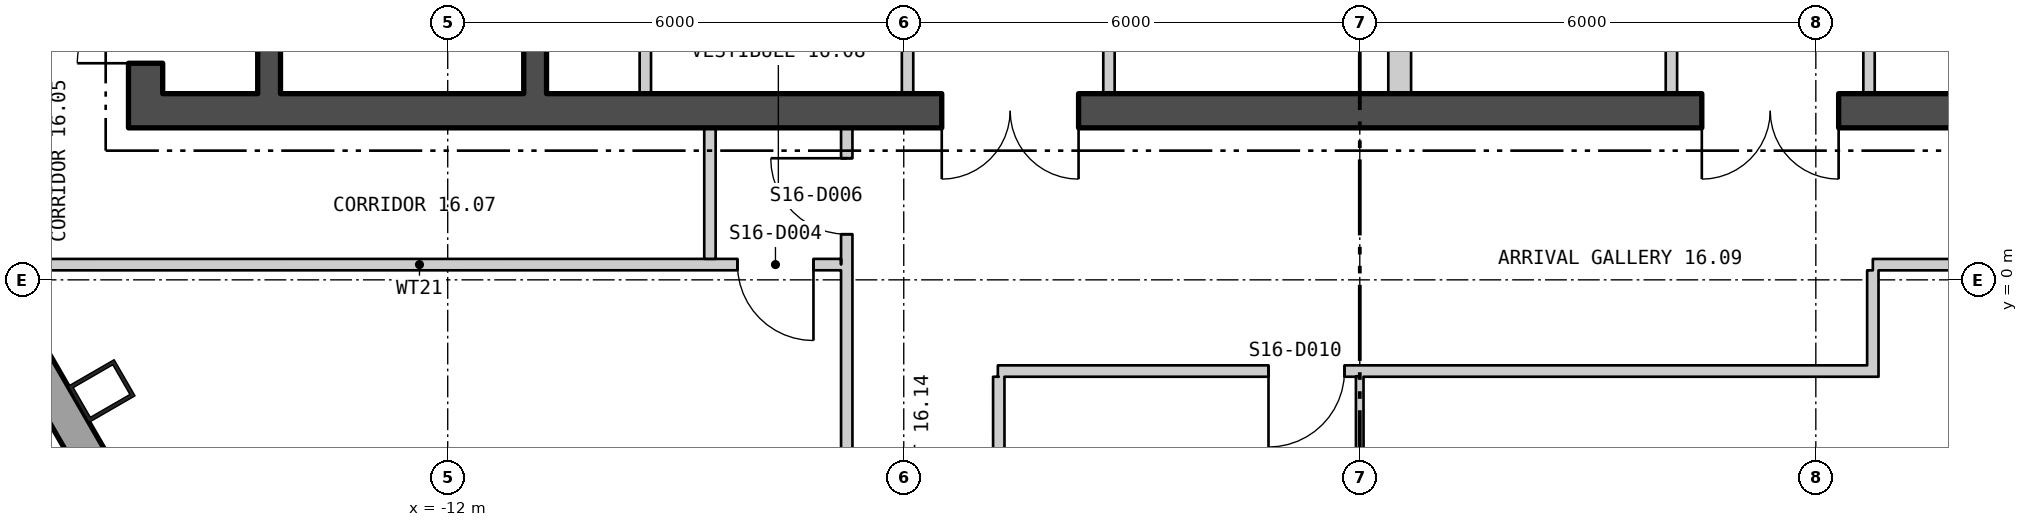
"""IFC4 building model, lengths in metres.
Left out: names, types, materials, properties, quantities, classifications, styles, units other than length and angle.
Written with IfcOpenShell. Run it as: python <this file> out.ifc"""

import sys

from ifc_helpers import new_model, si_unit, direction, frame, frame_2d, origin, origin_2d, place, context, subcontext, project, spatial, polyline, rectangle, hollow_rectangle, outline, extrude, element, fill, save


model = new_model("IFC4")
c1 = context("Model", 3, precision=1e-05, world=origin(), true_north=direction((0.0, 1.0)))
c2 = subcontext(c1, "Body", "Model", "MODEL_VIEW")
j1 = project(units=[si_unit("LENGTHUNIT", "METRE"), si_unit("PLANEANGLEUNIT", "RADIAN")], contexts=[c1])
p1 = place(None, origin())
s1 = spatial("IfcSite", under=j1, at=p1, CompositionType="ELEMENT")
p2 = place(p1, origin())
s2 = spatial("IfcBuilding", under=s1, at=p2, CompositionType="ELEMENT")
p3 = place(p2, frame((0.0, 0.0, 216.0)))
s3 = spatial("IfcBuildingStorey", under=s2, at=p3, CompositionType="ELEMENT", Elevation=216.0)
p4 = place(p3, frame((-16.554, -1.463, 0.0), z_axis=(0.0, 0.0, 1.0), x_axis=(0.5, -0.866025403784, 0.0)))
e1 = element("IfcColumn", 1, at=p4, inside=s3, PredefinedType="COLUMN", context=c2, shape_type="SweptSolid", body=[
    extrude(hollow_rectangle(XDim=0.55, YDim=0.7, WallThickness=0.05, at=origin_2d()), origin(), (0.0, 0.0, 1.0), 3.9),
])
p5 = place(p3, frame((-26.235, 14.155, -0.18), z_axis=(0.0, 0.0, 1.0), x_axis=(0.500000335318, -0.866025210188, 0.0)))
e2 = element("IfcWall", 2, at=p5, inside=s3, PredefinedType="SOLIDWALL", context=c2, shape_type="SweptSolid", body=[
    extrude(outline(polyline([(-0.13, -0.225), (45.88, -0.225), (45.62, 0.225), (0.13, 0.225), (-0.13, -0.225)])), origin(), (0.0, 0.0, 1.0), 3.68),
])
p6 = place(p5, frame((1.425, 0.0, 1.08)))
e3 = element("IfcOpeningElement", 3, at=p6, cuts=e2, PredefinedType="OPENING", context=c2, shape_type="SweptSolid", body=[
    extrude(rectangle(XDim=2.4, YDim=2.0, at=frame_2d((1.2, 1.0))), frame((0.0, 0.235, 0.0), z_axis=(0.0, -1.0, 0.0), x_axis=(1.0, 0.0, 0.0)), (0.0, 0.0, 1.0), 0.47),
])
p7 = place(p5, frame((5.895, 0.0, 1.08)))
e4 = element("IfcOpeningElement", 4, at=p7, cuts=e2, PredefinedType="OPENING", context=c2, shape_type="SweptSolid", body=[
    extrude(rectangle(XDim=2.4, YDim=2.0, at=frame_2d((1.2, 1.0))), frame((0.0, 0.235, 0.0), z_axis=(0.0, -1.0, 0.0), x_axis=(1.0, 0.0, 0.0)), (0.0, 0.0, 1.0), 0.47),
])
p8 = place(p5, frame((10.403, 0.0, 1.08)))
e5 = element("IfcOpeningElement", 5, at=p8, cuts=e2, PredefinedType="OPENING", context=c2, shape_type="SweptSolid", body=[
    extrude(rectangle(XDim=2.4, YDim=2.0, at=frame_2d((1.2, 1.0))), frame((0.0, 0.235, 0.0), z_axis=(0.0, -1.0, 0.0), x_axis=(1.0, 0.0, 0.0)), (0.0, 0.0, 1.0), 0.47),
])
p9 = place(p5, frame((19.421, 0.0, 1.08)))
e6 = element("IfcOpeningElement", 6, at=p9, cuts=e2, PredefinedType="OPENING", context=c2, shape_type="SweptSolid", body=[
    extrude(rectangle(XDim=2.4, YDim=2.0, at=frame_2d((1.2, 1.0))), frame((0.0, 0.235, 0.0), z_axis=(0.0, -1.0, 0.0), x_axis=(1.0, 0.0, 0.0)), (0.0, 0.0, 1.0), 0.47),
])
p10 = place(p5, frame((23.929, 0.0, 1.08)))
e7 = element("IfcOpeningElement", 7, at=p10, cuts=e2, PredefinedType="OPENING", context=c2, shape_type="SweptSolid", body=[
    extrude(rectangle(XDim=2.4, YDim=2.0, at=frame_2d((1.2, 1.0))), frame((0.0, 0.235, 0.0), z_axis=(0.0, -1.0, 0.0), x_axis=(1.0, 0.0, 0.0)), (0.0, 0.0, 1.0), 0.47),
])
p11 = place(p5, frame((28.438, 0.0, 1.08)))
e8 = element("IfcOpeningElement", 8, at=p11, cuts=e2, PredefinedType="OPENING", context=c2, shape_type="SweptSolid", body=[
    extrude(rectangle(XDim=2.4, YDim=2.0, at=frame_2d((1.2, 1.0))), frame((0.0, 0.235, 0.0), z_axis=(0.0, -1.0, 0.0), x_axis=(1.0, 0.0, 0.0)), (0.0, 0.0, 1.0), 0.47),
])
p12 = place(p5, frame((32.947, 0.0, 1.08)))
e9 = element("IfcOpeningElement", 9, at=p12, cuts=e2, PredefinedType="OPENING", context=c2, shape_type="SweptSolid", body=[
    extrude(rectangle(XDim=2.4, YDim=2.0, at=frame_2d((1.2, 1.0))), frame((0.0, 0.235, 0.0), z_axis=(0.0, -1.0, 0.0), x_axis=(1.0, 0.0, 0.0)), (0.0, 0.0, 1.0), 0.47),
])
p13 = place(p5, frame((41.925, 0.0, 1.08)))
e10 = element("IfcOpeningElement", 10, at=p13, cuts=e2, PredefinedType="OPENING", context=c2, shape_type="SweptSolid", body=[
    extrude(rectangle(XDim=2.4, YDim=2.0, at=frame_2d((1.2, 1.0))), frame((0.0, 0.235, 0.0), z_axis=(0.0, -1.0, 0.0), x_axis=(1.0, 0.0, 0.0)), (0.0, 0.0, 1.0), 0.47),
])
p14 = place(p3, frame((3.36, -25.466, -0.18), z_axis=(0.0, 0.0, 1.0), x_axis=(0.500000335318, 0.866025210188, 0.0)))
e11 = element("IfcWall", 11, at=p14, inside=s3, PredefinedType="SOLIDWALL", context=c2, shape_type="SweptSolid", body=[
    extrude(outline(polyline([(-0.13, -0.225), (45.88, -0.225), (45.62, 0.225), (0.13, 0.225), (-0.13, -0.225)])), origin(), (0.0, 0.0, 1.0), 3.68),
])
p15 = place(p14, frame((1.425, 0.0, 1.08)))
e12 = element("IfcOpeningElement", 12, at=p15, cuts=e11, PredefinedType="OPENING", context=c2, shape_type="SweptSolid", body=[
    extrude(rectangle(XDim=2.4, YDim=2.0, at=frame_2d((1.2, 1.0))), frame((0.0, 0.235, 0.0), z_axis=(0.0, -1.0, 0.0), x_axis=(1.0, 0.0, 0.0)), (0.0, 0.0, 1.0), 0.47),
])
p16 = place(p14, frame((5.895, 0.0, 1.08)))
e13 = element("IfcOpeningElement", 13, at=p16, cuts=e11, PredefinedType="OPENING", context=c2, shape_type="SweptSolid", body=[
    extrude(rectangle(XDim=2.4, YDim=2.0, at=frame_2d((1.2, 1.0))), frame((0.0, 0.235, 0.0), z_axis=(0.0, -1.0, 0.0), x_axis=(1.0, 0.0, 0.0)), (0.0, 0.0, 1.0), 0.47),
])
p17 = place(p14, frame((10.403, 0.0, 1.08)))
e14 = element("IfcOpeningElement", 14, at=p17, cuts=e11, PredefinedType="OPENING", context=c2, shape_type="SweptSolid", body=[
    extrude(rectangle(XDim=2.4, YDim=2.0, at=frame_2d((1.2, 1.0))), frame((0.0, 0.235, 0.0), z_axis=(0.0, -1.0, 0.0), x_axis=(1.0, 0.0, 0.0)), (0.0, 0.0, 1.0), 0.47),
])
p18 = place(p14, frame((14.912, 0.0, 1.08)))
e15 = element("IfcOpeningElement", 15, at=p18, cuts=e11, PredefinedType="OPENING", context=c2, shape_type="SweptSolid", body=[
    extrude(rectangle(XDim=2.4, YDim=2.0, at=frame_2d((1.2, 1.0))), frame((0.0, 0.235, 0.0), z_axis=(0.0, -1.0, 0.0), x_axis=(1.0, 0.0, 0.0)), (0.0, 0.0, 1.0), 0.47),
])
p19 = place(p14, frame((19.421, 0.0, 1.08)))
e16 = element("IfcOpeningElement", 16, at=p19, cuts=e11, PredefinedType="OPENING", context=c2, shape_type="SweptSolid", body=[
    extrude(rectangle(XDim=2.4, YDim=2.0, at=frame_2d((1.2, 1.0))), frame((0.0, 0.235, 0.0), z_axis=(0.0, -1.0, 0.0), x_axis=(1.0, 0.0, 0.0)), (0.0, 0.0, 1.0), 0.47),
])
p20 = place(p14, frame((23.929, 0.0, 1.08)))
e17 = element("IfcOpeningElement", 17, at=p20, cuts=e11, PredefinedType="OPENING", context=c2, shape_type="SweptSolid", body=[
    extrude(rectangle(XDim=2.4, YDim=2.0, at=frame_2d((1.2, 1.0))), frame((0.0, 0.235, 0.0), z_axis=(0.0, -1.0, 0.0), x_axis=(1.0, 0.0, 0.0)), (0.0, 0.0, 1.0), 0.47),
])
p21 = place(p14, frame((32.947, 0.0, 1.08)))
e18 = element("IfcOpeningElement", 18, at=p21, cuts=e11, PredefinedType="OPENING", context=c2, shape_type="SweptSolid", body=[
    extrude(rectangle(XDim=2.4, YDim=2.0, at=frame_2d((1.2, 1.0))), frame((0.0, 0.235, 0.0), z_axis=(0.0, -1.0, 0.0), x_axis=(1.0, 0.0, 0.0)), (0.0, 0.0, 1.0), 0.47),
])
p22 = place(p14, frame((37.455, 0.0, 1.08)))
e19 = element("IfcOpeningElement", 19, at=p22, cuts=e11, PredefinedType="OPENING", context=c2, shape_type="SweptSolid", body=[
    extrude(rectangle(XDim=2.4, YDim=2.0, at=frame_2d((1.2, 1.0))), frame((0.0, 0.235, 0.0), z_axis=(0.0, -1.0, 0.0), x_axis=(1.0, 0.0, 0.0)), (0.0, 0.0, 1.0), 0.47),
])
p23 = place(p14, frame((41.925, 0.0, 1.08)))
e20 = element("IfcOpeningElement", 20, at=p23, cuts=e11, PredefinedType="OPENING", context=c2, shape_type="SweptSolid", body=[
    extrude(rectangle(XDim=2.4, YDim=2.0, at=frame_2d((1.2, 1.0))), frame((0.0, 0.235, 0.0), z_axis=(0.0, -1.0, 0.0), x_axis=(1.0, 0.0, 0.0)), (0.0, 0.0, 1.0), 0.47),
])
p24 = place(p3, frame((-16.2, 2.225, 0.0), z_axis=(0.0, 0.0, 1.0), x_axis=(1.0, 0.0, 0.0)))
e21 = element("IfcWall", 21, at=p24, inside=s3, PredefinedType="SHEAR", context=c2, shape_type="SweptSolid", body=[
    extrude(rectangle(XDim=32.4, YDim=0.45, at=frame_2d((16.2, 0.0))), origin(), (0.0, 0.0, 1.0), 3.7),
])
p25 = place(p24, frame((10.7, 0.0, 0.0)))
e22 = element("IfcOpeningElement", 22, at=p25, cuts=e21, PredefinedType="OPENING", context=c2, shape_type="SweptSolid", body=[
    extrude(rectangle(XDim=1.8, YDim=2.4, at=frame_2d((0.9, 1.2))), frame((0.0, 0.235, 0.0), z_axis=(0.0, -1.0, 0.0), x_axis=(1.0, 0.0, 0.0)), (0.0, 0.0, 1.0), 0.47),
])
p26 = place(p24, frame((20.7, 0.0, 0.0)))
e23 = element("IfcOpeningElement", 23, at=p26, cuts=e21, PredefinedType="OPENING", context=c2, shape_type="SweptSolid", body=[
    extrude(rectangle(XDim=1.8, YDim=2.4, at=frame_2d((0.9, 1.2))), frame((0.0, 0.235, 0.0), z_axis=(0.0, -1.0, 0.0), x_axis=(1.0, 0.0, 0.0)), (0.0, 0.0, 1.0), 0.47),
])
p27 = place(p3, frame((-15.975, 2.45, 0.0), z_axis=(0.0, 0.0, 1.0), x_axis=(0.0, 1.0, 0.0)))
e24 = element("IfcWall", 24, at=p27, inside=s3, PredefinedType="SHEAR", context=c2, shape_type="SweptSolid", body=[
    extrude(rectangle(XDim=15.1, YDim=0.45, at=frame_2d((7.55, 0.0))), origin(), (0.0, 0.0, 1.0), 3.7),
])
p28 = place(p27, frame((4.4, 0.0, 0.0)))
e25 = element("IfcOpeningElement", 25, at=p28, cuts=e24, PredefinedType="OPENING", context=c2, shape_type="SweptSolid", body=[
    extrude(rectangle(XDim=1.5, YDim=2.1, at=frame_2d((0.75, 1.05))), frame((0.0, 0.235, 0.0), z_axis=(0.0, -1.0, 0.0), x_axis=(1.0, 0.0, 0.0)), (0.0, 0.0, 1.0), 0.47),
])
p29 = place(p27, frame((0.4, 0.0, 0.0)))
e26 = element("IfcOpeningElement", 26, at=p29, cuts=e24, PredefinedType="OPENING", context=c2, shape_type="SweptSolid", body=[
    extrude(rectangle(XDim=0.9, YDim=2.1, at=frame_2d((0.45, 1.05))), frame((0.0, 0.235, 0.0), z_axis=(0.0, -1.0, 0.0), x_axis=(1.0, 0.0, 0.0)), (0.0, 0.0, 1.0), 0.47),
])
p30 = place(p27, frame((2.5, 0.0, 0.0)))
e27 = element("IfcOpeningElement", 27, at=p30, cuts=e24, PredefinedType="OPENING", context=c2, shape_type="SweptSolid", body=[
    extrude(rectangle(XDim=0.9, YDim=2.1, at=frame_2d((0.45, 1.05))), frame((0.0, 0.235, 0.0), z_axis=(0.0, -1.0, 0.0), x_axis=(1.0, 0.0, 0.0)), (0.0, 0.0, 1.0), 0.47),
])
p31 = place(p27, frame((6.475, 0.0, 0.0)))
e28 = element("IfcOpeningElement", 28, at=p31, cuts=e24, PredefinedType="OPENING", context=c2, shape_type="SweptSolid", body=[
    extrude(rectangle(XDim=1.0, YDim=2.1, at=frame_2d((0.5, 1.05))), frame((0.0, 0.235, 0.0), z_axis=(0.0, -1.0, 0.0), x_axis=(1.0, 0.0, 0.0)), (0.0, 0.0, 1.0), 0.47),
])
p32 = place(p27, frame((11.125, 0.0, 0.0)))
e29 = element("IfcOpeningElement", 29, at=p32, cuts=e24, PredefinedType="OPENING", context=c2, shape_type="SweptSolid", body=[
    extrude(rectangle(XDim=0.9, YDim=2.1, at=frame_2d((0.45, 1.05))), frame((0.0, 0.235, 0.0), z_axis=(0.0, -1.0, 0.0), x_axis=(1.0, 0.0, 0.0)), (0.0, 0.0, 1.0), 0.47),
])
p33 = place(p3, frame((-10.85, 2.45, 0.0), z_axis=(0.0, 0.0, 1.0), x_axis=(0.0, 1.0, 0.0)))
e30 = element("IfcWall", 30, at=p33, inside=s3, PredefinedType="SHEAR", context=c2, shape_type="SweptSolid", body=[
    extrude(rectangle(XDim=15.1, YDim=0.3, at=frame_2d((7.55, 0.0))), origin(), (0.0, 0.0, 1.0), 3.7),
])
p34 = place(p33, frame((3.525, 0.0, 0.0)))
e31 = element("IfcOpeningElement", 31, at=p34, cuts=e30, PredefinedType="OPENING", context=c2, shape_type="SweptSolid", body=[
    extrude(rectangle(XDim=1.25, YDim=2.1, at=frame_2d((0.625, 1.05))), frame((0.0, 0.16, 0.0), z_axis=(0.0, -1.0, 0.0), x_axis=(1.0, 0.0, 0.0)), (0.0, 0.0, 1.0), 0.32),
])
p35 = place(p33, frame((1.15, 0.0, 0.0)))
e32 = element("IfcOpeningElement", 32, at=p35, cuts=e30, PredefinedType="OPENING", context=c2, shape_type="SweptSolid", body=[
    extrude(rectangle(XDim=1.0, YDim=2.1, at=frame_2d((0.5, 1.05))), frame((0.0, 0.16, 0.0), z_axis=(0.0, -1.0, 0.0), x_axis=(1.0, 0.0, 0.0)), (0.0, 0.0, 1.0), 0.32),
])
p36 = place(p3, frame((-14.35, 2.45, 0.0), z_axis=(0.0, 0.0, 1.0), x_axis=(0.0, 1.0, 0.0)))
e33 = element("IfcWall", 33, at=p36, inside=s3, PredefinedType="SHEAR", context=c2, shape_type="SweptSolid", body=[
    extrude(rectangle(XDim=15.1, YDim=0.3, at=frame_2d((7.55, 0.0))), origin(), (0.0, 0.0, 1.0), 3.7),
])
p37 = place(p36, frame((4.4, 0.0, 0.0)))
e34 = element("IfcOpeningElement", 34, at=p37, cuts=e33, PredefinedType="OPENING", context=c2, shape_type="SweptSolid", body=[
    extrude(rectangle(XDim=1.5, YDim=2.1, at=frame_2d((0.75, 1.05))), frame((0.0, 0.16, 0.0), z_axis=(0.0, -1.0, 0.0), x_axis=(1.0, 0.0, 0.0)), (0.0, 0.0, 1.0), 0.32),
])
for number, where, z_axis, x_axis in (
    (35, (-9.4, 2.45, 0.0), (0.0, 0.0, 1.0), (0.0, 1.0, 0.0)),
    (36, (-5.95, 2.45, 0.0), (0.0, 0.0, 1.0), (0.0, 1.0, 0.0)),
    (37, (-3.3, 2.45, 0.0), (0.0, 0.0, 1.0), (0.0, 1.0, 0.0)),
    (38, (0.45, 2.45, 0.0), (0.0, 0.0, 1.0), (0.0, 1.0, 0.0)),
    (39, (0.6, 2.45, 0.0), (0.0, 0.0, 1.0), (0.0, 1.0, 0.0)),
    (40, (4.1, 2.45, 0.0), (0.0, 0.0, 1.0), (0.0, 1.0, 0.0)),
):
    element("IfcWall", number, at=place(p3, frame(where, z_axis=z_axis, x_axis=x_axis)), inside=s3, PredefinedType="PARTITIONING", context=c2, shape_type="SweptSolid", body=[
        extrude(rectangle(XDim=3.575, YDim=0.15, at=frame_2d((1.788, 0.0))), origin(), (0.0, 0.0, 1.0), 3.7),
    ])
p38 = place(p3, frame((6.7, 2.45, 0.0), z_axis=(0.0, 0.0, 1.0), x_axis=(0.0, 1.0, 0.0)))
e41 = element("IfcWall", 41, at=p38, inside=s3, PredefinedType="PARTITIONING", context=c2, shape_type="SweptSolid", body=[
    extrude(rectangle(XDim=2.975, YDim=0.15, at=frame_2d((1.488, 0.0))), origin(), (0.0, 0.0, 1.0), 3.7),
])
p39 = place(p3, frame((-17.918, 0.2, 0.0), z_axis=(0.0, 0.0, 1.0), x_axis=(0.999999995937, 9.0146939e-05, 0.0)))
e42 = element("IfcWall", 42, at=p39, inside=s3, PredefinedType="PARTITIONING", context=c2, shape_type="SweptSolid", body=[
    extrude(rectangle(XDim=11.093, YDim=0.15, at=frame_2d((5.546, 0.0))), origin(), (0.0, 0.0, 1.0), 3.7),
])
p40 = place(p39, frame((9.73, 0.0, 0.0)))
e43 = element("IfcOpeningElement", 43, at=p40, cuts=e42, PredefinedType="OPENING", context=c2, shape_type="SweptSolid", body=[
    extrude(rectangle(XDim=1.0, YDim=2.1, at=frame_2d((0.5, 1.05))), frame((0.0, 0.085, 0.0), z_axis=(0.0, -1.0, 0.0), x_axis=(1.0, 0.0, 0.0)), (0.0, 0.0, 1.0), 0.17),
])
p41 = place(p3, frame((-8.55, 0.276, 0.0), z_axis=(0.0, 0.0, 1.0), x_axis=(0.0, 1.0, 0.0)))
e44 = element("IfcWall", 44, at=p41, inside=s3, PredefinedType="PARTITIONING", context=c2, shape_type="SweptSolid", body=[
    extrude(rectangle(XDim=1.723, YDim=0.15, at=frame_2d((0.862, 0.0))), origin(), (0.0, 0.0, 1.0), 3.7),
])
p42 = place(p3, frame((-6.75, -3.412, 0.0), z_axis=(0.0, 0.0, 1.0), x_axis=(0.0, 1.0, 0.0)))
e45 = element("IfcWall", 45, at=p42, inside=s3, PredefinedType="PARTITIONING", context=c2, shape_type="SweptSolid", body=[
    extrude(rectangle(XDim=5.412, YDim=0.15, at=frame_2d((2.706, 0.0))), origin(), (0.0, 0.0, 1.0), 3.7),
])
p43 = place(p42, frame((4.012, 0.0, 0.0)))
e46 = element("IfcOpeningElement", 46, at=p43, cuts=e45, PredefinedType="OPENING", context=c2, shape_type="SweptSolid", body=[
    extrude(rectangle(XDim=1.0, YDim=2.1, at=frame_2d((0.5, 1.05))), frame((0.0, 0.085, 0.0), z_axis=(0.0, -1.0, 0.0), x_axis=(1.0, 0.0, 0.0)), (0.0, 0.0, 1.0), 0.17),
])
p44 = place(p3, frame((-4.762, -1.2, 0.0), z_axis=(0.0, 0.0, 1.0), x_axis=(1.0, 0.0, 0.0)))
e47 = element("IfcWall", 47, at=p44, inside=s3, PredefinedType="PARTITIONING", context=c2, shape_type="SweptSolid", body=[
    extrude(rectangle(XDim=11.587, YDim=0.15, at=frame_2d((5.793, 0.0))), origin(), (0.0, 0.0, 1.0), 3.7),
])
p45 = place(p44, frame((3.561, 0.0, 0.0)))
e48 = element("IfcOpeningElement", 48, at=p45, cuts=e47, PredefinedType="OPENING", context=c2, shape_type="SweptSolid", body=[
    extrude(rectangle(XDim=1.0, YDim=2.1, at=frame_2d((0.5, 1.05))), frame((0.0, 0.085, 0.0), z_axis=(0.0, -1.0, 0.0), x_axis=(1.0, 0.0, 0.0)), (0.0, 0.0, 1.0), 0.17),
])
p46 = place(p3, frame((-4.75, -1.275, 0.0), z_axis=(0.0, 0.0, 1.0), x_axis=(0.000453514693, -0.999999897162, 0.0)))
e49 = element("IfcWall", 49, at=p46, inside=s3, PredefinedType="PARTITIONING", context=c2, shape_type="SweptSolid", body=[
    extrude(rectangle(XDim=2.205, YDim=0.15, at=frame_2d((1.103, 0.0))), origin(), (0.0, 0.0, 1.0), 3.7),
])
p47 = place(p3, frame((-0.001, -1.275, 0.0), z_axis=(0.0, 0.0, 1.0), x_axis=(0.000438356122, -0.999999903922, 0.0)))
e50 = element("IfcWall", 50, at=p47, inside=s3, PredefinedType="PARTITIONING", context=c2, shape_type="SweptSolid", body=[
    extrude(rectangle(XDim=1.825, YDim=0.1, at=frame_2d((0.912, 0.0))), origin(), (0.0, 0.0, 1.0), 3.15),
])
p48 = place(p3, frame((6.75, -1.125, 0.0), z_axis=(0.0, 0.0, 1.0), x_axis=(0.0, 1.0, 0.0)))
e51 = element("IfcWall", 51, at=p48, inside=s3, PredefinedType="PARTITIONING", context=c2, shape_type="SweptSolid", body=[
    extrude(rectangle(XDim=1.25, YDim=0.15, at=frame_2d((0.625, 0.0))), origin(), (0.0, 0.0, 1.0), 3.7),
])
p49 = place(p3, frame((6.75, 0.2, 0.0), z_axis=(0.0, 0.0, 1.0), x_axis=(1.0, 0.0, 0.0)))
e52 = element("IfcWall", 52, at=p49, inside=s3, PredefinedType="PARTITIONING", context=c2, shape_type="SweptSolid", body=[
    extrude(rectangle(XDim=11.168, YDim=0.15, at=frame_2d((5.584, 0.0))), origin(), (0.0, 0.0, 1.0), 3.7),
])
p50 = place(p49, frame((4.03, 0.0, 0.0)))
e53 = element("IfcOpeningElement", 53, at=p50, cuts=e52, PredefinedType="OPENING", context=c2, shape_type="SweptSolid", body=[
    extrude(rectangle(XDim=1.0, YDim=2.1, at=frame_2d((0.5, 1.05))), frame((0.0, 0.085, 0.0), z_axis=(0.0, -1.0, 0.0), x_axis=(1.0, 0.0, 0.0)), (0.0, 0.0, 1.0), 0.17),
])
p51 = place(p29, origin())
e54 = element("IfcDoor", 54, at=p51, inside=s3, OperationType="SINGLE_SWING_RIGHT", PredefinedType="DOOR", context=c2, shape_type="SweptSolid", body=[
    extrude(rectangle(XDim=0.9, YDim=2.1, at=frame_2d((0.45, 1.05))), frame((0.0, 0.025, 0.0), z_axis=(0.0, -1.0, 0.0), x_axis=(1.0, 0.0, 0.0)), (0.0, 0.0, 1.0), 0.05),
])
fill(e26, e54)
p52 = place(p25, origin())
e55 = element("IfcDoor", 55, at=p52, inside=s3, OperationType="DOUBLE_DOOR_SINGLE_SWING", PredefinedType="DOOR", context=c2, shape_type="SweptSolid", body=[
    extrude(rectangle(XDim=1.8, YDim=2.4, at=frame_2d((0.9, 1.2))), frame((0.0, 0.025, 0.0), z_axis=(0.0, -1.0, 0.0), x_axis=(1.0, 0.0, 0.0)), (0.0, 0.0, 1.0), 0.05),
])
fill(e22, e55)
p53 = place(p26, origin())
e56 = element("IfcDoor", 56, at=p53, inside=s3, OperationType="DOUBLE_DOOR_SINGLE_SWING", PredefinedType="DOOR", context=c2, shape_type="SweptSolid", body=[
    extrude(rectangle(XDim=1.8, YDim=2.4, at=frame_2d((0.9, 1.2))), frame((0.0, 0.025, 0.0), z_axis=(0.0, -1.0, 0.0), x_axis=(1.0, 0.0, 0.0)), (0.0, 0.0, 1.0), 0.05),
])
fill(e23, e56)
p54 = place(p40, origin())
e57 = element("IfcDoor", 57, at=p54, inside=s3, OperationType="SINGLE_SWING_RIGHT", PredefinedType="DOOR", context=c2, shape_type="SweptSolid", body=[
    extrude(rectangle(XDim=1.0, YDim=2.1, at=frame_2d((0.5, 1.05))), frame((0.0, 0.025, 0.0), z_axis=(0.0, -1.0, 0.0), x_axis=(1.0, 0.0, 0.0)), (0.0, 0.0, 1.0), 0.05),
])
fill(e43, e57)
p55 = place(p43, origin())
e58 = element("IfcDoor", 58, at=p55, inside=s3, OperationType="SINGLE_SWING_LEFT", PredefinedType="DOOR", context=c2, shape_type="SweptSolid", body=[
    extrude(rectangle(XDim=1.0, YDim=2.1, at=frame_2d((0.5, 1.05))), frame((0.0, 0.025, 0.0), z_axis=(0.0, -1.0, 0.0), x_axis=(1.0, 0.0, 0.0)), (0.0, 0.0, 1.0), 0.05),
])
fill(e46, e58)
p56 = place(p45, origin())
e59 = element("IfcDoor", 59, at=p56, inside=s3, OperationType="SINGLE_SWING_LEFT", PredefinedType="DOOR", context=c2, shape_type="SweptSolid", body=[
    extrude(rectangle(XDim=1.0, YDim=2.1, at=frame_2d((0.5, 1.05))), frame((0.0, 0.025, 0.0), z_axis=(0.0, -1.0, 0.0), x_axis=(1.0, 0.0, 0.0)), (0.0, 0.0, 1.0), 0.05),
])
fill(e48, e59)
save(model, sys.argv[1])
